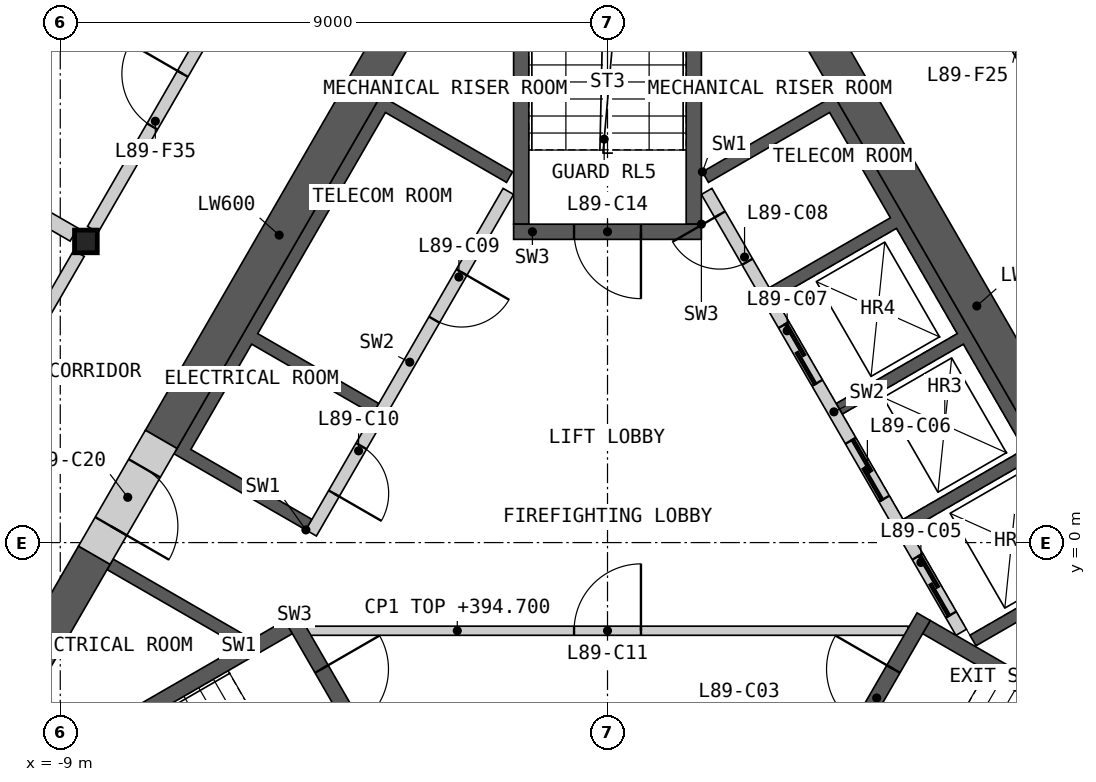
"""IFC4 building model, lengths in metres.
Left out: names, types, materials, properties, quantities, classifications, styles, units other than length and angle.
Written with IfcOpenShell. Run it as: python <this file> out.ifc"""

import sys

from ifc_helpers import new_model, si_unit, direction, frame, frame_2d, origin, origin_2d, place, context, subcontext, project, spatial, polyline, rectangle, i_section, outline, extrude, element, fill, save


model = new_model("IFC4")
c1 = context("Model", 3, precision=1e-05, world=origin(), true_north=direction((0.0, 1.0)))
c2 = subcontext(c1, "Body", "Model", "MODEL_VIEW")
j1 = project(units=[si_unit("LENGTHUNIT", "METRE"), si_unit("PLANEANGLEUNIT", "RADIAN")], contexts=[c1])
p1 = place(None, origin())
s1 = spatial("IfcSite", under=j1, at=p1, CompositionType="ELEMENT")
p2 = place(p1, origin())
s2 = spatial("IfcBuilding", under=s1, at=p2, CompositionType="ELEMENT")
p3 = place(p2, frame((0.0, 0.0, 391.6)))
s3 = spatial("IfcBuildingStorey", under=s2, at=p3, CompositionType="ELEMENT", Elevation=391.6)
p4 = place(p3, frame((-8.578, 4.953, 0.0), z_axis=(0.0, 0.0, 1.0), x_axis=(1.0, 0.0, 0.0)))
e1 = element("IfcColumn", 1, at=p4, inside=s3, PredefinedType="COLUMN", context=c2, shape_type="SweptSolid", body=[
    extrude(i_section(OverallWidth=0.374, OverallDepth=0.372, WebThickness=0.016, FlangeThickness=0.026, at=origin_2d()), origin(), (0.0, 0.0, 1.0), 3.4),
])
p5 = place(p3, origin())
e2 = element("IfcWall", 2, at=p5, inside=s3, PredefinedType="SHEAR", context=c2, shape_type="SweptSolid", body=[
    extrude(outline(polyline([(1.561, 6.097), (3.731, 7.35), (8.231, -0.444), (6.061, -1.697), (5.96, -1.524), (7.952, -0.374), (6.952, 1.358), (4.96, 0.208), (4.861, 0.381), (6.852, 1.531), (5.852, 3.263), (3.861, 2.113), (3.76, 2.287), (5.752, 3.437), (4.752, 5.169), (2.76, 4.019), (2.66, 4.192), (4.652, 5.342), (3.652, 7.074), (1.66, 5.924), (1.561, 6.097)])), origin(), (0.0, 0.0, 1.0), 3.1),
])
p6 = place(p3, frame((5.817, -1.476, 0.0), z_axis=(0.0, 0.0, 1.0), x_axis=(-0.500002616675, 0.866023893041, 0.0)))
e3 = element("IfcWall", 3, at=p6, inside=s3, PredefinedType="SOLIDWALL", context=c2, shape_type="SweptSolid", body=[
    extrude(rectangle(XDim=8.373, YDim=0.2, at=frame_2d((4.187, 0.0))), origin(), (0.0, 0.0, 1.0), 3.1),
])
p7 = place(p6, frame((0.337, 0.0, 0.0)))
e4 = element("IfcOpeningElement", 4, at=p7, cuts=e3, PredefinedType="OPENING", context=c2, shape_type="SweptSolid", body=[
    extrude(rectangle(XDim=1.1, YDim=2.1, at=frame_2d((0.55, 1.05))), frame((0.0, 0.11, 0.0), z_axis=(0.0, -1.0, 0.0), x_axis=(1.0, 0.0, 0.0)), (0.0, 0.0, 1.0), 0.22),
])
p8 = place(p6, frame((2.537, 0.0, 0.0)))
e5 = element("IfcOpeningElement", 5, at=p8, cuts=e3, PredefinedType="OPENING", context=c2, shape_type="SweptSolid", body=[
    extrude(rectangle(XDim=1.1, YDim=2.1, at=frame_2d((0.55, 1.05))), frame((0.0, 0.11, 0.0), z_axis=(0.0, -1.0, 0.0), x_axis=(1.0, 0.0, 0.0)), (0.0, 0.0, 1.0), 0.22),
])
p9 = place(p6, frame((4.737, 0.0, 0.0)))
e6 = element("IfcOpeningElement", 6, at=p9, cuts=e3, PredefinedType="OPENING", context=c2, shape_type="SweptSolid", body=[
    extrude(rectangle(XDim=1.1, YDim=2.1, at=frame_2d((0.55, 1.05))), frame((0.0, 0.11, 0.0), z_axis=(0.0, -1.0, 0.0), x_axis=(1.0, 0.0, 0.0)), (0.0, 0.0, 1.0), 0.22),
])
p10 = place(p6, frame((7.037, 0.0, 0.0)))
e7 = element("IfcOpeningElement", 7, at=p10, cuts=e3, PredefinedType="OPENING", context=c2, shape_type="SweptSolid", body=[
    extrude(rectangle(XDim=0.9, YDim=2.1, at=frame_2d((0.45, 1.05))), frame((0.0, 0.11, 0.0), z_axis=(0.0, -1.0, 0.0), x_axis=(1.0, 0.0, 0.0)), (0.0, 0.0, 1.0), 0.22),
])
p11 = place(p3, origin())
e8 = element("IfcWall", 8, at=p11, inside=s3, PredefinedType="SHEAR", context=c2, shape_type="SweptSolid", body=[
    extrude(outline(polyline([(-6.061, -1.697), (-8.231, -0.444), (-8.131, -0.271), (-5.96, -1.524), (-6.061, -1.697)])), origin(), (0.0, 0.0, 1.0), 3.1),
])
p12 = place(p3, origin())
e9 = element("IfcWall", 9, at=p12, inside=s3, PredefinedType="SHEAR", context=c2, shape_type="SweptSolid", body=[
    extrude(outline(polyline([(-4.96, 0.208), (-7.131, 1.461), (-3.731, 7.35), (-1.561, 6.097), (-1.66, 5.924), (-3.652, 7.074), (-5.752, 3.437), (-3.76, 2.287), (-3.861, 2.113), (-5.852, 3.263), (-6.852, 1.531), (-4.861, 0.381), (-4.96, 0.208)])), origin(), (0.0, 0.0, 1.0), 3.1),
])
p13 = place(p3, frame((-1.631, 5.776, 0.0), z_axis=(0.0, 0.0, 1.0), x_axis=(-0.499992876559, -0.866029516466, 0.0)))
e10 = element("IfcWall", 10, at=p13, inside=s3, PredefinedType="SOLIDWALL", context=c2, shape_type="SweptSolid", body=[
    extrude(rectangle(XDim=6.486, YDim=0.2, at=frame_2d((3.243, 0.0))), origin(), (0.0, 0.0, 1.0), 3.1),
])
p14 = place(p13, frame((1.537, 0.0, 0.0)))
e11 = element("IfcOpeningElement", 11, at=p14, cuts=e10, PredefinedType="OPENING", context=c2, shape_type="SweptSolid", body=[
    extrude(rectangle(XDim=0.9, YDim=2.1, at=frame_2d((0.45, 1.05))), frame((0.0, 0.11, 0.0), z_axis=(0.0, -1.0, 0.0), x_axis=(1.0, 0.0, 0.0)), (0.0, 0.0, 1.0), 0.22),
])
p15 = place(p13, frame((4.837, 0.0, 0.0)))
e12 = element("IfcOpeningElement", 12, at=p15, cuts=e10, PredefinedType="OPENING", context=c2, shape_type="SweptSolid", body=[
    extrude(rectangle(XDim=0.9, YDim=2.1, at=frame_2d((0.45, 1.05))), frame((0.0, 0.11, 0.0), z_axis=(0.0, -1.0, 0.0), x_axis=(1.0, 0.0, 0.0)), (0.0, 0.0, 1.0), 0.22),
])
p16 = place(p3, frame((-4.941, -1.45, 0.0), z_axis=(0.0, 0.0, 1.0), x_axis=(1.0, 0.0, 0.0)))
e13 = element("IfcWall", 13, at=p16, inside=s3, PredefinedType="PARTITIONING", context=c2, shape_type="SweptSolid", body=[
    extrude(rectangle(XDim=9.882, YDim=0.15, at=frame_2d((4.941, 0.0))), origin(), (0.0, 0.0, 1.0), 3.1),
])
p17 = place(p16, frame((4.391, 0.0, 0.0)))
e14 = element("IfcOpeningElement", 14, at=p17, cuts=e13, PredefinedType="OPENING", context=c2, shape_type="SweptSolid", body=[
    extrude(rectangle(XDim=1.1, YDim=2.1, at=frame_2d((0.55, 1.05))), frame((0.0, 0.085, 0.0), z_axis=(0.0, -1.0, 0.0), x_axis=(1.0, 0.0, 0.0)), (0.0, 0.0, 1.0), 0.17),
])
p18 = place(p3, origin())
e15 = element("IfcWall", 15, at=p18, inside=s3, PredefinedType="SHEAR", context=c2, shape_type="SweptSolid", body=[
    extrude(outline(polyline([(-5.307, -1.281), (-10.374, -4.206), (-10.032, -4.298), (-5.182, -1.498), (-5.307, -1.281)])), origin(), (0.0, 0.0, 1.0), 3.1),
])
p19 = place(p3, frame((-5.199, -1.219, 0.0), z_axis=(0.0, 0.0, 1.0), x_axis=(0.499982516597, -0.866035497597, 0.0)))
e16 = element("IfcWall", 16, at=p19, inside=s3, PredefinedType="SHEAR", context=c2, shape_type="SweptSolid", body=[
    extrude(rectangle(XDim=3.088, YDim=0.25, at=frame_2d((1.544, 0.0))), origin(), (0.0, 0.0, 1.0), 3.1),
])
p20 = place(p19, frame((0.994, 0.0, 0.0)))
e17 = element("IfcOpeningElement", 17, at=p20, cuts=e16, PredefinedType="OPENING", context=c2, shape_type="SweptSolid", body=[
    extrude(rectangle(XDim=1.1, YDim=2.1, at=frame_2d((0.55, 1.05))), frame((0.0, 0.135, 0.0), z_axis=(0.0, -1.0, 0.0), x_axis=(1.0, 0.0, 0.0)), (0.0, 0.0, 1.0), 0.27),
])
p21 = place(p3, origin())
e18 = element("IfcWall", 18, at=p21, inside=s3, PredefinedType="SHEAR", context=c2, shape_type="SweptSolid", body=[
    extrude(outline(polyline([(10.032, -4.298), (10.374, -4.206), (5.307, -1.281), (5.182, -1.498), (10.032, -4.298)])), origin(), (0.0, 0.0, 1.0), 3.1),
])
p22 = place(p3, frame((3.655, -3.893, 0.0), z_axis=(0.0, 0.0, 1.0), x_axis=(0.499982516597, 0.866035497597, 0.0)))
e19 = element("IfcWall", 19, at=p22, inside=s3, PredefinedType="SHEAR", context=c2, shape_type="SweptSolid", body=[
    extrude(rectangle(XDim=3.088, YDim=0.25, at=frame_2d((1.544, 0.0))), origin(), (0.0, 0.0, 1.0), 3.1),
])
p23 = place(p22, frame((0.994, 0.0, 0.0)))
e20 = element("IfcOpeningElement", 20, at=p23, cuts=e19, PredefinedType="OPENING", context=c2, shape_type="SweptSolid", body=[
    extrude(rectangle(XDim=1.1, YDim=2.1, at=frame_2d((0.55, 1.05))), frame((0.0, 0.135, 0.0), z_axis=(0.0, -1.0, 0.0), x_axis=(1.0, 0.0, 0.0)), (0.0, 0.0, 1.0), 0.27),
])
p24 = place(p3, origin())
e21 = element("IfcWall", 21, at=p24, inside=s3, PredefinedType="SHEAR", context=c2, shape_type="SweptSolid", body=[
    extrude(outline(polyline([(1.544, 5.237), (1.544, 11.087), (1.294, 10.837), (1.294, 5.237), (1.544, 5.237)])), origin(), (0.0, 0.0, 1.0), 3.1),
])
p25 = place(p3, origin())
e22 = element("IfcWall", 22, at=p25, inside=s3, PredefinedType="SHEAR", context=c2, shape_type="SweptSolid", body=[
    extrude(outline(polyline([(-1.294, 10.837), (-1.544, 11.087), (-1.544, 5.237), (-1.294, 5.237), (-1.294, 10.837)])), origin(), (0.0, 0.0, 1.0), 3.1),
])
p26 = place(p3, frame((1.544, 5.112, 0.0), z_axis=(0.0, 0.0, 1.0), x_axis=(-1.0, 0.0, 0.0)))
e23 = element("IfcWall", 23, at=p26, inside=s3, PredefinedType="SHEAR", context=c2, shape_type="SweptSolid", body=[
    extrude(rectangle(XDim=3.088, YDim=0.25, at=frame_2d((1.544, 0.0))), origin(), (0.0, 0.0, 1.0), 3.1),
])
p27 = place(p26, frame((0.994, 0.0, 0.0)))
e24 = element("IfcOpeningElement", 24, at=p27, cuts=e23, PredefinedType="OPENING", context=c2, shape_type="SweptSolid", body=[
    extrude(rectangle(XDim=1.1, YDim=2.1, at=frame_2d((0.55, 1.05))), frame((0.0, 0.135, 0.0), z_axis=(0.0, -1.0, 0.0), x_axis=(1.0, 0.0, 0.0)), (0.0, 0.0, 1.0), 0.27),
])
p28 = place(p3, frame((8.686, -0.634, 0.0), z_axis=(0.0, 0.0, 1.0), x_axis=(-0.50001836461, 0.866014800712, 0.0)))
e25 = element("IfcWall", 25, at=p28, inside=s3, PredefinedType="SHEAR", context=c2, shape_type="SweptSolid", body=[
    extrude(rectangle(XDim=10.451, YDim=0.6, at=frame_2d((5.225, 0.0))), origin(), (0.0, 0.0, 1.0), 3.1),
])
p29 = place(p3, frame((-3.461, 8.417, 0.0), z_axis=(0.0, 0.0, 1.0), x_axis=(-0.50000391502, -0.866023143435, 0.0)))
e26 = element("IfcWall", 26, at=p29, inside=s3, PredefinedType="SHEAR", context=c2, shape_type="SweptSolid", body=[
    extrude(rectangle(XDim=7.759, YDim=0.6, at=frame_2d((3.879, 0.0))), origin(), (0.0, 0.0, 1.0), 3.1),
])
p30 = place(p3, frame((-8.44, -0.208, 0.0), z_axis=(0.0, 0.0, 1.0), x_axis=(-0.500007425856, -0.866021116422, 0.0)))
e27 = element("IfcWall", 27, at=p30, inside=s3, PredefinedType="SHEAR", context=c2, shape_type="SweptSolid", body=[
    extrude(rectangle(XDim=4.969, YDim=0.6, at=frame_2d((2.484, 0.0))), origin(), (0.0, 0.0, 1.0), 3.1),
])
p31 = place(p3, frame((-7.34, 1.698, 0.0), z_axis=(0.0, 0.0, 1.0), x_axis=(-0.50002983664, -0.866008176907, 0.0)))
e28 = element("IfcWall", 28, at=p31, inside=s3, PredefinedType="SHEAR", context=c2, shape_type="SweptSolid", body=[
    extrude(rectangle(XDim=2.2, YDim=0.6, at=frame_2d((1.1, 0.0))), origin(), (0.0, 0.0, 1.0), 3.1),
])
p32 = place(p31, frame((0.55, 0.0, 0.0)))
e29 = element("IfcOpeningElement", 29, at=p32, cuts=e28, PredefinedType="OPENING", context=c2, shape_type="SweptSolid", body=[
    extrude(rectangle(XDim=1.1, YDim=2.1, at=frame_2d((0.55, 1.05))), frame((0.0, 0.31, 0.0), z_axis=(0.0, -1.0, 0.0), x_axis=(1.0, 0.0, 0.0)), (0.0, 0.0, 1.0), 0.62),
])
p33 = place(p3, frame((4.403, 12.185, 0.0), z_axis=(0.0, 0.0, 1.0), x_axis=(0.499992155518, -0.866029932751, 0.0)))
e30 = element("IfcWall", 30, at=p33, inside=s3, PredefinedType="PARTITIONING", context=c2, shape_type="SweptSolid", body=[
    extrude(rectangle(XDim=8.123, YDim=0.2, at=frame_2d((4.062, 0.0))), origin(), (0.0, 0.0, 1.0), 3.1),
])
p34 = place(p33, frame((3.762, 0.0, 0.0)))
e31 = element("IfcOpeningElement", 31, at=p34, cuts=e30, PredefinedType="OPENING", context=c2, shape_type="SweptSolid", body=[
    extrude(rectangle(XDim=1.0, YDim=2.1, at=frame_2d((0.5, 1.05))), frame((0.0, 0.11, 0.0), z_axis=(0.0, -1.0, 0.0), x_axis=(1.0, 0.0, 0.0)), (0.0, 0.0, 1.0), 0.22),
])
p35 = place(p3, frame((-8.465, 5.15, 0.0), z_axis=(0.0, 0.0, 1.0), x_axis=(0.499992155518, 0.866029932751, 0.0)))
e32 = element("IfcWall", 32, at=p35, inside=s3, PredefinedType="PARTITIONING", context=c2, shape_type="SweptSolid", body=[
    extrude(rectangle(XDim=8.123, YDim=0.2, at=frame_2d((4.062, 0.0))), origin(), (0.0, 0.0, 1.0), 3.1),
])
p36 = place(p35, frame((1.956, 0.0, 0.0)))
e33 = element("IfcOpeningElement", 33, at=p36, cuts=e32, PredefinedType="OPENING", context=c2, shape_type="SweptSolid", body=[
    extrude(rectangle(XDim=1.0, YDim=2.1, at=frame_2d((0.5, 1.05))), frame((0.0, 0.11, 0.0), z_axis=(0.0, -1.0, 0.0), x_axis=(1.0, 0.0, 0.0)), (0.0, 0.0, 1.0), 0.22),
])
p37 = place(p3, frame((-12.754, -2.279, 0.0), z_axis=(0.0, 0.0, 1.0), x_axis=(0.500001682468, 0.866024432409, 0.0)))
e34 = element("IfcWall", 34, at=p37, inside=s3, PredefinedType="PARTITIONING", context=c2, shape_type="SweptSolid", body=[
    extrude(rectangle(XDim=8.124, YDim=0.2, at=frame_2d((4.062, 0.0))), origin(), (0.0, 0.0, 1.0), 3.1),
])
p38 = place(p37, frame((3.762, 0.0, 0.0)))
e35 = element("IfcOpeningElement", 35, at=p38, cuts=e34, PredefinedType="OPENING", context=c2, shape_type="SweptSolid", body=[
    extrude(rectangle(XDim=1.0, YDim=2.1, at=frame_2d((0.5, 1.05))), frame((0.0, 0.11, 0.0), z_axis=(0.0, -1.0, 0.0), x_axis=(1.0, 0.0, 0.0)), (0.0, 0.0, 1.0), 0.22),
])
p39 = place(p3, frame((-10.873, 6.278, 0.0), z_axis=(0.0, 0.0, 1.0), x_axis=(0.865989219354, -0.500062668036, 0.0)))
e36 = element("IfcWall", 36, at=p39, inside=s3, PredefinedType="PARTITIONING", context=c2, shape_type="SweptSolid", body=[
    extrude(rectangle(XDim=2.423, YDim=0.25, at=frame_2d((1.211, 0.0))), origin(), (0.0, 0.0, 1.0), 2.33),
])
p40 = place(p7, origin())
e37 = element("IfcDoor", 37, at=p40, inside=s3, OperationType="SLIDING_TO_LEFT", PredefinedType="DOOR", context=c2, shape_type="SweptSolid", body=[
    extrude(rectangle(XDim=1.1, YDim=2.1, at=frame_2d((0.55, 1.05))), frame((0.0, 0.025, 0.0), z_axis=(0.0, -1.0, 0.0), x_axis=(1.0, 0.0, 0.0)), (0.0, 0.0, 1.0), 0.05),
])
fill(e4, e37)
p41 = place(p8, origin())
e38 = element("IfcDoor", 38, at=p41, inside=s3, OperationType="SLIDING_TO_LEFT", PredefinedType="DOOR", context=c2, shape_type="SweptSolid", body=[
    extrude(rectangle(XDim=1.1, YDim=2.1, at=frame_2d((0.55, 1.05))), frame((0.0, 0.025, 0.0), z_axis=(0.0, -1.0, 0.0), x_axis=(1.0, 0.0, 0.0)), (0.0, 0.0, 1.0), 0.05),
])
fill(e5, e38)
p42 = place(p9, origin())
e39 = element("IfcDoor", 39, at=p42, inside=s3, OperationType="SLIDING_TO_LEFT", PredefinedType="DOOR", context=c2, shape_type="SweptSolid", body=[
    extrude(rectangle(XDim=1.1, YDim=2.1, at=frame_2d((0.55, 1.05))), frame((0.0, 0.025, 0.0), z_axis=(0.0, -1.0, 0.0), x_axis=(1.0, 0.0, 0.0)), (0.0, 0.0, 1.0), 0.05),
])
fill(e6, e39)
p43 = place(p10, origin())
e40 = element("IfcDoor", 40, at=p43, inside=s3, OperationType="SINGLE_SWING_RIGHT", PredefinedType="DOOR", context=c2, shape_type="SweptSolid", body=[
    extrude(rectangle(XDim=0.9, YDim=2.1, at=frame_2d((0.45, 1.05))), frame((0.0, 0.025, 0.0), z_axis=(0.0, -1.0, 0.0), x_axis=(1.0, 0.0, 0.0)), (0.0, 0.0, 1.0), 0.05),
])
fill(e7, e40)
p44 = place(p14, origin())
e41 = element("IfcDoor", 41, at=p44, inside=s3, OperationType="SINGLE_SWING_LEFT", PredefinedType="DOOR", context=c2, shape_type="SweptSolid", body=[
    extrude(rectangle(XDim=0.9, YDim=2.1, at=frame_2d((0.45, 1.05))), frame((0.0, 0.025, 0.0), z_axis=(0.0, -1.0, 0.0), x_axis=(1.0, 0.0, 0.0)), (0.0, 0.0, 1.0), 0.05),
])
fill(e11, e41)
p45 = place(p15, origin())
e42 = element("IfcDoor", 42, at=p45, inside=s3, OperationType="SINGLE_SWING_RIGHT", PredefinedType="DOOR", context=c2, shape_type="SweptSolid", body=[
    extrude(rectangle(XDim=0.9, YDim=2.1, at=frame_2d((0.45, 1.05))), frame((0.0, 0.025, 0.0), z_axis=(0.0, -1.0, 0.0), x_axis=(1.0, 0.0, 0.0)), (0.0, 0.0, 1.0), 0.05),
])
fill(e12, e42)
p46 = place(p17, origin())
e43 = element("IfcDoor", 43, at=p46, inside=s3, OperationType="SINGLE_SWING_RIGHT", PredefinedType="DOOR", context=c2, shape_type="SweptSolid", body=[
    extrude(rectangle(XDim=1.1, YDim=2.1, at=frame_2d((0.55, 1.05))), frame((0.0, 0.025, 0.0), z_axis=(0.0, -1.0, 0.0), x_axis=(1.0, 0.0, 0.0)), (0.0, 0.0, 1.0), 0.05),
])
fill(e14, e43)
p47 = place(p20, origin())
e44 = element("IfcDoor", 44, at=p47, inside=s3, OperationType="SINGLE_SWING_LEFT", PredefinedType="DOOR", context=c2, shape_type="SweptSolid", body=[
    extrude(rectangle(XDim=1.1, YDim=2.1, at=frame_2d((0.55, 1.05))), frame((0.0, 0.025, 0.0), z_axis=(0.0, -1.0, 0.0), x_axis=(1.0, 0.0, 0.0)), (0.0, 0.0, 1.0), 0.05),
])
fill(e17, e44)
p48 = place(p23, origin())
e45 = element("IfcDoor", 45, at=p48, inside=s3, OperationType="SINGLE_SWING_RIGHT", PredefinedType="DOOR", context=c2, shape_type="SweptSolid", body=[
    extrude(rectangle(XDim=1.1, YDim=2.1, at=frame_2d((0.55, 1.05))), frame((0.0, 0.025, 0.0), z_axis=(0.0, -1.0, 0.0), x_axis=(1.0, 0.0, 0.0)), (0.0, 0.0, 1.0), 0.05),
])
fill(e20, e45)
p49 = place(p27, origin())
e46 = element("IfcDoor", 46, at=p49, inside=s3, OperationType="SINGLE_SWING_LEFT", PredefinedType="DOOR", context=c2, shape_type="SweptSolid", body=[
    extrude(rectangle(XDim=1.1, YDim=2.1, at=frame_2d((0.55, 1.05))), frame((0.0, 0.025, 0.0), z_axis=(0.0, -1.0, 0.0), x_axis=(1.0, 0.0, 0.0)), (0.0, 0.0, 1.0), 0.05),
])
fill(e24, e46)
p50 = place(p32, origin())
e47 = element("IfcDoor", 47, at=p50, inside=s3, OperationType="SINGLE_SWING_RIGHT", PredefinedType="DOOR", context=c2, shape_type="SweptSolid", body=[
    extrude(rectangle(XDim=1.1, YDim=2.1, at=frame_2d((0.55, 1.05))), frame((0.0, 0.055, 0.0), z_axis=(0.0, -1.0, 0.0), x_axis=(1.0, 0.0, 0.0)), (0.0, 0.0, 1.0), 0.05),
])
fill(e29, e47)
p51 = place(p34, origin())
e48 = element("IfcDoor", 48, at=p51, inside=s3, OperationType="SINGLE_SWING_LEFT", PredefinedType="DOOR", context=c2, shape_type="SweptSolid", body=[
    extrude(rectangle(XDim=1.0, YDim=2.1, at=frame_2d((0.5, 1.05))), frame((0.0, 0.025, 0.0), z_axis=(0.0, -1.0, 0.0), x_axis=(1.0, 0.0, 0.0)), (0.0, 0.0, 1.0), 0.05),
])
fill(e31, e48)
p52 = place(p36, origin())
e49 = element("IfcDoor", 49, at=p52, inside=s3, OperationType="SINGLE_SWING_RIGHT", PredefinedType="DOOR", context=c2, shape_type="SweptSolid", body=[
    extrude(rectangle(XDim=1.0, YDim=2.1, at=frame_2d((0.5, 1.05))), frame((0.0, 0.025, 0.0), z_axis=(0.0, -1.0, 0.0), x_axis=(1.0, 0.0, 0.0)), (0.0, 0.0, 1.0), 0.05),
])
fill(e33, e49)
save(model, sys.argv[1])
